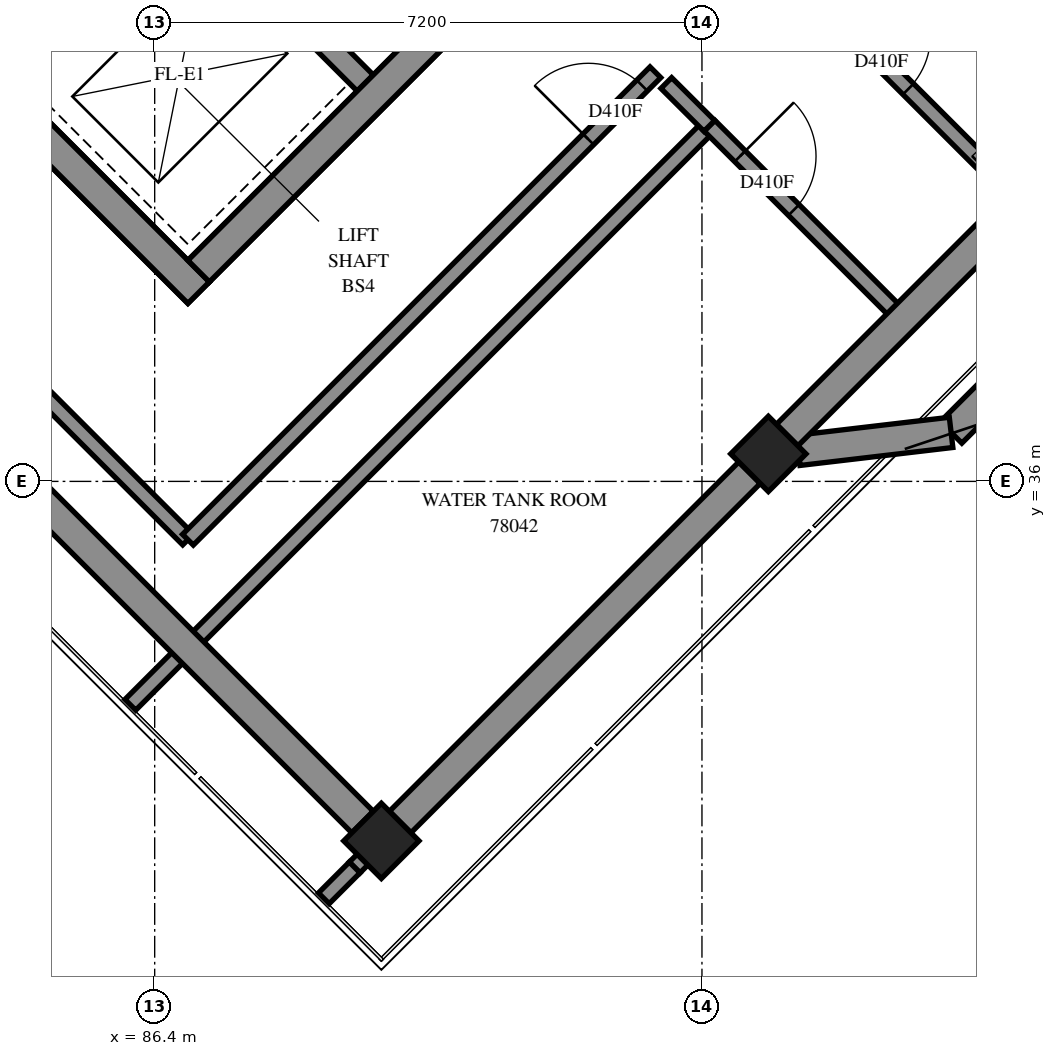
"""IFC4 building model, lengths in metres.
Left out: names, types, materials, properties, quantities, classifications, styles, units other than length and angle.
Written with IfcOpenShell. Run it as: python <this file> out.ifc"""

import sys

from ifc_helpers import new_model, si_unit, direction, frame, frame_2d, origin, origin_2d, place, context, subcontext, project, spatial, polyline, rectangle, outline, extrude, element, fill, save


model = new_model("IFC4")
c1 = context("Model", 3, precision=1e-05, world=origin(), true_north=direction((0.0, 1.0)))
c2 = subcontext(c1, "Body", "Model", "MODEL_VIEW")
j1 = project(units=[si_unit("LENGTHUNIT", "METRE"), si_unit("PLANEANGLEUNIT", "RADIAN")], contexts=[c1])
p1 = place(None, origin())
s1 = spatial("IfcSite", under=j1, at=p1, CompositionType="ELEMENT")
p2 = place(p1, origin())
s2 = spatial("IfcBuilding", under=s1, at=p2, CompositionType="ELEMENT")
p3 = place(p2, frame((0.0, 0.0, 284.6)))
s3 = spatial("IfcBuildingStorey", under=s2, at=p3, CompositionType="ELEMENT", Elevation=284.6)
for number, where, z_axis, x_axis in (
    (1, (94.474, 36.362, 0.0), (0.0, 0.0, 1.0), (0.707, -0.707, 0.0)),
    (2, (89.382, 31.271, 0.0), (0.0, 0.0, 1.0), (0.707, -0.707, 0.0)),
):
    element("IfcColumn", number, at=place(p3, frame(where, z_axis=z_axis, x_axis=x_axis)), inside=s3, PredefinedType="COLUMN", context=c2, shape_type="SweptSolid", body=[
        extrude(rectangle(XDim=0.7, YDim=0.7, at=origin_2d()), origin(), (0.0, 0.0, 1.0), 5.7),
    ])
p4 = place(p3, frame((76.23, 49.231, -0.3), z_axis=(0.0, 0.0, 1.0), x_axis=(0.7071034917, -0.7071100706, 0.0)))
e3 = element("IfcWall", 3, at=p4, inside=s3, PredefinedType="SHEAR", context=c2, shape_type="SweptSolid", body=[
    extrude(rectangle(XDim=15.2, YDim=0.4, at=frame_2d((7.6, 0.0))), origin(), (0.0, 0.0, 1.0), 5.3),
])
p5 = place(p3, frame((86.978, 38.766, -0.3), z_axis=(0.0, 0.0, 1.0), x_axis=(0.7071067812, 0.7071067812, 0.0)))
e4 = element("IfcWall", 4, at=p5, inside=s3, PredefinedType="SHEAR", context=c2, shape_type="SweptSolid", body=[
    extrude(rectangle(XDim=14.4, YDim=0.4, at=frame_2d((7.2, 0.0))), origin(), (0.0, 0.0, 1.0), 5.3),
])
p6 = place(p5, frame((4.55, 0.0, 0.3)))
e5 = element("IfcOpeningElement", 5, at=p6, cuts=e4, PredefinedType="OPENING", context=c2, shape_type="SweptSolid", body=[
    extrude(rectangle(XDim=1.1, YDim=2.1, at=frame_2d((0.55, 1.05))), frame((0.0, 0.21, 0.0), z_axis=(0.0, -1.0, 0.0), x_axis=(1.0, 0.0, 0.0)), (0.0, 0.0, 1.0), 0.42),
])
p7 = place(p5, frame((11.35, 0.0, 0.3)))
e6 = element("IfcOpeningElement", 6, at=p7, cuts=e4, PredefinedType="OPENING", context=c2, shape_type="SweptSolid", body=[
    extrude(rectangle(XDim=1.1, YDim=2.1, at=frame_2d((0.55, 1.05))), frame((0.0, 0.21, 0.0), z_axis=(0.0, -1.0, 0.0), x_axis=(1.0, 0.0, 0.0)), (0.0, 0.0, 1.0), 0.42),
])
p8 = place(p3, frame((84.291, 41.453, 0.0), z_axis=(0.0, 0.0, 1.0), x_axis=(0.7071067812, 0.7071067812, 0.0)))
e7 = element("IfcWall", 7, at=p8, inside=s3, PredefinedType="SOLIDWALL", context=c2, shape_type="SweptSolid", body=[
    extrude(rectangle(XDim=3.3, YDim=0.3, at=frame_2d((1.65, 0.0))), origin(), (0.0, 0.0, 1.0), 5.7),
])
p9 = place(p3, frame((78.988, 51.423, 0.0), z_axis=(0.0, 0.0, 1.0), x_axis=(0.7071067812, -0.7071067812, 0.0)))
e8 = element("IfcWall", 8, at=p9, inside=s3, PredefinedType="SOLIDWALL", context=c2, shape_type="SweptSolid", body=[
    extrude(rectangle(XDim=14.4, YDim=0.3, at=frame_2d((7.2, 0.0))), origin(), (0.0, 0.0, 1.0), 5.7),
])
p10 = place(p9, frame((1.35, 0.0, 0.0)))
e9 = element("IfcOpeningElement", 9, at=p10, cuts=e8, PredefinedType="OPENING", context=c2, shape_type="SweptSolid", body=[
    extrude(rectangle(XDim=0.9, YDim=2.1, at=frame_2d((0.45, 1.05))), frame((0.0, 0.16, 0.0), z_axis=(0.0, -1.0, 0.0), x_axis=(1.0, 0.0, 0.0)), (0.0, 0.0, 1.0), 0.32),
])
p11 = place(p9, frame((4.95, 0.0, 0.0)))
e10 = element("IfcOpeningElement", 10, at=p11, cuts=e8, PredefinedType="OPENING", context=c2, shape_type="SweptSolid", body=[
    extrude(rectangle(XDim=0.9, YDim=2.1, at=frame_2d((0.45, 1.05))), frame((0.0, 0.16, 0.0), z_axis=(0.0, -1.0, 0.0), x_axis=(1.0, 0.0, 0.0)), (0.0, 0.0, 1.0), 0.32),
])
p12 = place(p9, frame((8.55, 0.0, 0.0)))
e11 = element("IfcOpeningElement", 11, at=p12, cuts=e8, PredefinedType="OPENING", context=c2, shape_type="SweptSolid", body=[
    extrude(rectangle(XDim=0.9, YDim=2.1, at=frame_2d((0.45, 1.05))), frame((0.0, 0.16, 0.0), z_axis=(0.0, -1.0, 0.0), x_axis=(1.0, 0.0, 0.0)), (0.0, 0.0, 1.0), 0.32),
])
p13 = place(p9, frame((12.05, 0.0, 0.0)))
e12 = element("IfcOpeningElement", 12, at=p13, cuts=e8, PredefinedType="OPENING", context=c2, shape_type="SweptSolid", body=[
    extrude(rectangle(XDim=1.1, YDim=2.1, at=frame_2d((0.55, 1.05))), frame((0.0, 0.16, 0.0), z_axis=(0.0, -1.0, 0.0), x_axis=(1.0, 0.0, 0.0)), (0.0, 0.0, 1.0), 0.32),
])
p14 = place(p3, frame((86.079, 33.061, 0.0), z_axis=(0.0, 0.0, 1.0), x_axis=(0.7071067812, 0.7071067812, 0.0)))
e13 = element("IfcWall", 13, at=p14, inside=s3, PredefinedType="PARTITIONING", context=c2, shape_type="SweptSolid", body=[
    extrude(rectangle(XDim=10.771, YDim=0.2, at=frame_2d((5.385, 0.0))), origin(), (0.0, 0.0, 1.0), 5.7),
])
p15 = place(p3, frame((80.472, 41.603, 0.0), z_axis=(0.0, 0.0, 1.0), x_axis=(0.7071067812, -0.7071067812, 0.0)))
e14 = element("IfcWall", 14, at=p15, inside=s3, PredefinedType="PARTITIONING", context=c2, shape_type="SweptSolid", body=[
    extrude(rectangle(XDim=9.006, YDim=0.2, at=frame_2d((4.503, 0.0))), origin(), (0.0, 0.0, 1.0), 5.7),
])
p16 = place(p3, frame((86.837, 35.233, 0.0), z_axis=(0.0, 0.0, 1.0), x_axis=(0.7071067812, 0.7071067812, 0.0)))
e15 = element("IfcWall", 15, at=p16, inside=s3, PredefinedType="PARTITIONING", context=c2, shape_type="SweptSolid", body=[
    extrude(rectangle(XDim=8.697, YDim=0.2, at=frame_2d((4.349, 0.0))), origin(), (0.0, 0.0, 1.0), 5.7),
])
p17 = place(p16, frame((7.45, 0.0, 0.0)))
e16 = element("IfcOpeningElement", 16, at=p17, cuts=e15, PredefinedType="OPENING", context=c2, shape_type="SweptSolid", body=[
    extrude(rectangle(XDim=1.0, YDim=2.1, at=frame_2d((0.5, 1.05))), frame((0.0, 0.11, 0.0), z_axis=(0.0, -1.0, 0.0), x_axis=(1.0, 0.0, 0.0)), (0.0, 0.0, 1.0), 0.22),
])
p18 = place(p3, frame((89.031, 30.921, 0.0), z_axis=(0.0, 0.0, 1.0), x_axis=(0.7071067812, 0.7071067812, 0.0)))
e17 = element("IfcWall", 17, at=p18, inside=s3, PredefinedType="PARTITIONING", context=c2, shape_type="SweptSolid", body=[
    extrude(rectangle(XDim=8.191, YDim=0.2, at=frame_2d((4.096, 0.0))), origin(), (0.0, 0.0, 1.0), 5.2),
])
p19 = place(p3, frame((94.541, 42.935, 0.0), z_axis=(0.0, 0.0, 1.0), x_axis=(0.7071067812, -0.7071067812, 0.0)))
e18 = element("IfcWall", 18, at=p19, inside=s3, PredefinedType="PARTITIONING", context=c2, shape_type="SweptSolid", body=[
    extrude(rectangle(XDim=4.599, YDim=0.2, at=frame_2d((2.3, 0.0))), origin(), (0.0, 0.0, 1.0), 5.7),
])
p20 = place(p19, frame((1.508, 0.0, 0.0)))
e19 = element("IfcOpeningElement", 19, at=p20, cuts=e18, PredefinedType="OPENING", context=c2, shape_type="SweptSolid", body=[
    extrude(rectangle(XDim=1.0, YDim=2.1, at=frame_2d((0.5, 1.05))), frame((0.0, 0.11, 0.0), z_axis=(0.0, -1.0, 0.0), x_axis=(1.0, 0.0, 0.0)), (0.0, 0.0, 1.0), 0.22),
])
p21 = place(p3, frame((93.699, 40.679, 0.0), z_axis=(0.0, 0.0, 1.0), x_axis=(0.7071067812, -0.7071067812, 0.0)))
e20 = element("IfcWall", 20, at=p21, inside=s3, PredefinedType="PARTITIONING", context=c2, shape_type="SweptSolid", body=[
    extrude(rectangle(XDim=3.601, YDim=0.2, at=frame_2d((1.8, 0.0))), origin(), (0.0, 0.0, 1.0), 5.7),
])
p22 = place(p21, frame((0.568, 0.0, 0.0)))
e21 = element("IfcOpeningElement", 21, at=p22, cuts=e20, PredefinedType="OPENING", context=c2, shape_type="SweptSolid", body=[
    extrude(rectangle(XDim=1.0, YDim=2.1, at=frame_2d((0.5, 1.05))), frame((0.0, 0.11, 0.0), z_axis=(0.0, -1.0, 0.0), x_axis=(1.0, 0.0, 0.0)), (0.0, 0.0, 1.0), 0.22),
])
p23 = place(p3, frame((96.24, 38.132, 0.0), z_axis=(0.0, 0.0, 1.0), x_axis=(0.706651904, 0.7075613659, 0.0)))
e22 = element("IfcWall", 22, at=p23, inside=s3, PredefinedType="PARTITIONING", context=c2, shape_type="SweptSolid", body=[
    extrude(rectangle(XDim=2.199, YDim=0.2, at=frame_2d((1.1, 0.0))), origin(), (0.0, 0.0, 1.0), 5.2),
])
p24 = place(p3, frame((94.823, 36.713, 0.0), z_axis=(0.0, 0.0, 1.0), x_axis=(0.7071067812, 0.7071067812, 0.0)))
e23 = element("IfcWall", 23, at=p24, inside=s3, PredefinedType="PARTITIONING", context=c2, shape_type="SweptSolid", body=[
    extrude(rectangle(XDim=2.005, YDim=0.2, at=frame_2d((1.003, 0.0))), origin(), (0.0, 0.0, 1.0), 5.2),
])
p25 = place(p3, frame((93.131, 41.241, 0.0), z_axis=(0.0, 0.0, 1.0), x_axis=(0.7083571881, -0.7058541592, 0.0)))
e24 = element("IfcWall", 24, at=p25, inside=s3, PredefinedType="PARTITIONING", context=c2, shape_type="SweptSolid", body=[
    extrude(rectangle(XDim=0.799, YDim=0.2, at=frame_2d((0.4, 0.0))), origin(), (0.0, 0.0, 1.0), 5.7),
])
p26 = place(p3, frame((88.625, 30.515, 0.0), z_axis=(0.0, 0.0, 1.0), x_axis=(0.7071067812, 0.7071067812, 0.0)))
e25 = element("IfcWall", 25, at=p26, inside=s3, PredefinedType="PARTITIONING", context=c2, shape_type="SweptSolid", body=[
    extrude(rectangle(XDim=0.574, YDim=0.2, at=frame_2d((0.287, 0.0))), origin(), (0.0, 0.0, 1.0), 5.7),
])
p27 = place(p3, frame((98.713, 38.339, 0.0), z_axis=(0.0, 0.0, 1.0), x_axis=(-0.7071297964, -0.7070837653, 0.0)))
e26 = element("IfcWall", 26, at=p27, inside=s3, PredefinedType="PARAPET", context=c2, shape_type="SweptSolid", body=[
    extrude(outline(polyline([(0.0, -0.1), (2.172, -0.1), (2.172, 0.1), (0.0, 0.1), (0.0, -0.1)])), origin(), (0.0, 0.0, 1.0), 0.25),
])
p28 = place(p17, origin())
e27 = element("IfcDoor", 27, at=p28, inside=s3, OperationType="SINGLE_SWING_LEFT", PredefinedType="DOOR", context=c2, shape_type="SweptSolid", body=[
    extrude(rectangle(XDim=1.0, YDim=2.1, at=frame_2d((0.5, 1.05))), frame((0.0, 0.025, 0.0), z_axis=(0.0, -1.0, 0.0), x_axis=(1.0, 0.0, 0.0)), (0.0, 0.0, 1.0), 0.05),
])
fill(e16, e27)
p29 = place(p22, origin())
e28 = element("IfcDoor", 28, at=p29, inside=s3, OperationType="SINGLE_SWING_LEFT", PredefinedType="DOOR", context=c2, shape_type="SweptSolid", body=[
    extrude(rectangle(XDim=1.0, YDim=2.1, at=frame_2d((0.5, 1.05))), frame((0.0, 0.025, 0.0), z_axis=(0.0, -1.0, 0.0), x_axis=(1.0, 0.0, 0.0)), (0.0, 0.0, 1.0), 0.05),
])
fill(e21, e28)
p30 = place(p20, origin())
e29 = element("IfcDoor", 29, at=p30, inside=s3, OperationType="SINGLE_SWING_RIGHT", PredefinedType="DOOR", context=c2, shape_type="SweptSolid", body=[
    extrude(rectangle(XDim=1.0, YDim=2.1, at=frame_2d((0.5, 1.05))), frame((0.0, 0.025, 0.0), z_axis=(0.0, -1.0, 0.0), x_axis=(1.0, 0.0, 0.0)), (0.0, 0.0, 1.0), 0.05),
])
fill(e19, e29)
save(model, sys.argv[1])
